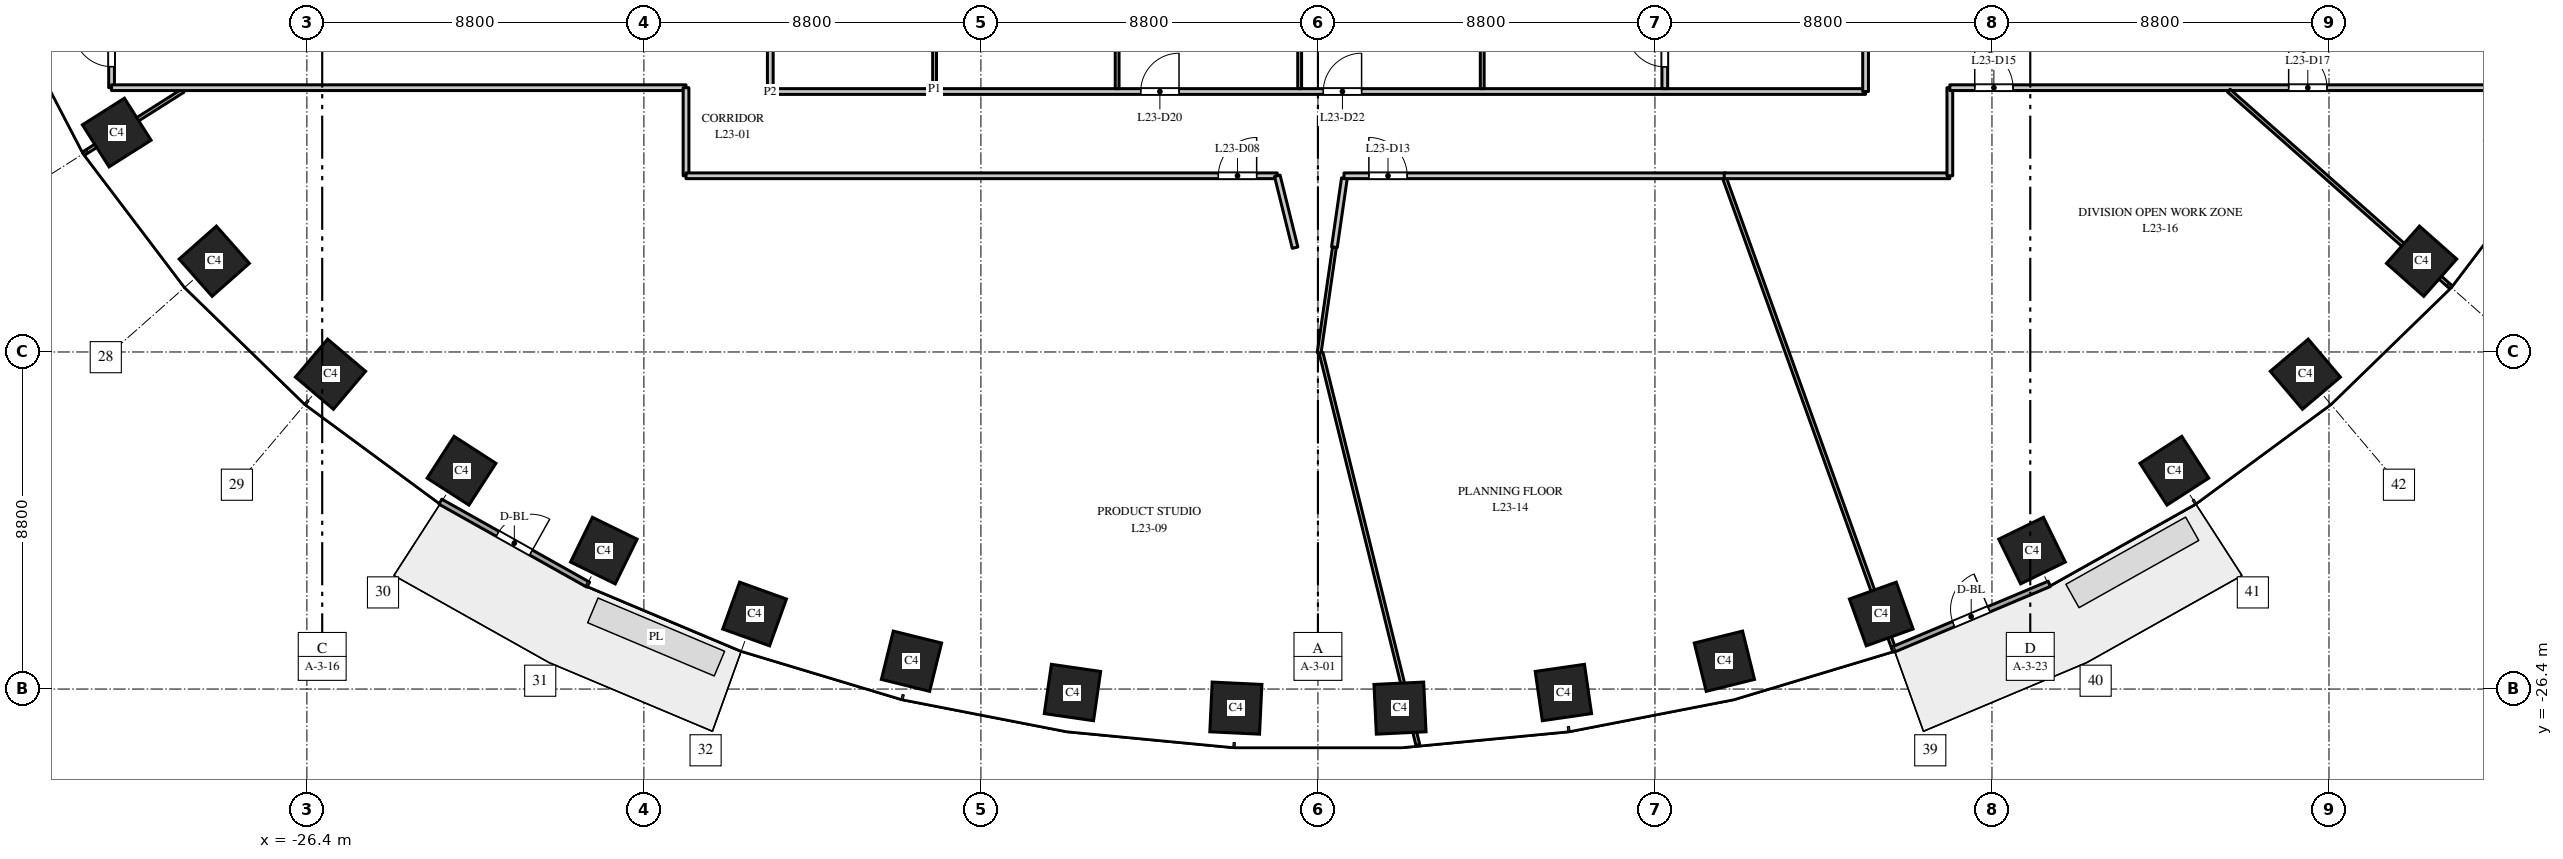
"""IFC4 building model, lengths in metres.
Left out: names, types, materials, properties, quantities, classifications, styles, units other than length and angle.
Written with IfcOpenShell. Run it as: python <this file> out.ifc"""

import sys

from ifc_helpers import new_model, si_unit, direction, frame, frame_2d, origin, origin_2d, place, context, subcontext, project, spatial, rectangle, extrude, element, fill, save


model = new_model("IFC4")
c1 = context("Model", 3, precision=1e-05, world=origin(), true_north=direction((0.0, 1.0)))
c2 = subcontext(c1, "Body", "Model", "MODEL_VIEW")
j1 = project(units=[si_unit("LENGTHUNIT", "METRE"), si_unit("PLANEANGLEUNIT", "RADIAN")], contexts=[c1])
p1 = place(None, origin())
s1 = spatial("IfcSite", under=j1, at=p1, CompositionType="ELEMENT")
p2 = place(p1, origin())
s2 = spatial("IfcBuilding", under=s1, at=p2, CompositionType="ELEMENT")
p3 = place(p2, frame((0.0, 0.0, 104.0)))
s3 = spatial("IfcBuildingStorey", under=s2, at=p3, CompositionType="ELEMENT", Elevation=104.0)
for number, where, z_axis, x_axis in (
    (1, (-31.365, -11.871, 0.0), (0.0, 0.0, 1.0), (0.535, -0.845, 0.0)),
    (2, (-28.819, -15.23, 0.0), (0.0, 0.0, 1.0), (0.663, -0.749, 0.0)),
    (3, (-25.783, -18.18, 0.0), (0.0, 0.0, 1.0), (0.763, -0.646, 0.0)),
    (4, (-22.362, -20.7, 0.0), (0.0, 0.0, 1.0), (0.84, -0.542, 0.0)),
    (5, (-18.646, -22.785, 0.0), (0.0, 0.0, 1.0), (0.898, -0.439, 0.0)),
    (6, (-14.709, -24.441, 0.0), (0.0, 0.0, 1.0), (0.941, -0.338, 0.0)),
    (7, (-10.613, -25.674, 0.0), (0.0, 0.0, 1.0), (0.971, -0.24, 0.0)),
    (8, (-6.409, -26.491, 0.0), (0.0, 0.0, 1.0), (0.99, -0.143, 0.0)),
    (9, (-2.143, -26.898, 0.0), (0.0, 0.0, 1.0), (0.999, -0.048, 0.0)),
    (10, (2.143, -26.898, 0.0), (0.0, 0.0, 1.0), (0.999, 0.048, 0.0)),
    (11, (6.409, -26.491, 0.0), (0.0, 0.0, 1.0), (0.99, 0.143, 0.0)),
    (12, (10.613, -25.674, 0.0), (0.0, 0.0, 1.0), (0.971, 0.24, 0.0)),
    (13, (14.709, -24.441, 0.0), (0.0, 0.0, 1.0), (0.941, 0.338, 0.0)),
    (14, (18.646, -22.785, 0.0), (0.0, 0.0, 1.0), (0.898, 0.439, 0.0)),
    (15, (22.362, -20.7, 0.0), (0.0, 0.0, 1.0), (0.84, 0.542, 0.0)),
    (16, (25.783, -18.18, 0.0), (0.0, 0.0, 1.0), (0.763, 0.646, 0.0)),
    (17, (28.819, -15.23, 0.0), (0.0, 0.0, 1.0), (0.663, 0.749, 0.0)),
):
    element("IfcColumn", number, at=place(p3, frame(where, z_axis=z_axis, x_axis=x_axis)), inside=s3, PredefinedType="COLUMN", context=c2, shape_type="SweptSolid", body=[
        extrude(rectangle(XDim=1.3, YDim=1.3, at=origin_2d()), origin(), (0.0, 0.0, 1.0), 4.0),
    ])
p4 = place(p3, frame((-22.913, -21.509, 0.0), z_axis=(0.0, 0.0, 1.0), x_axis=(0.872046572975, -0.489422899509, 0.0)))
e18 = element("IfcWall", 18, at=p4, inside=s3, PredefinedType="STANDARD", context=c2, shape_type="SweptSolid", body=[
    extrude(rectangle(XDim=4.426, YDim=0.15, at=frame_2d((2.213, 0.0))), origin(), (0.0, 0.0, 1.0), 3.7),
])
p5 = place(p4, frame((1.713, 0.0, 0.0)))
e19 = element("IfcOpeningElement", 19, at=p5, cuts=e18, PredefinedType="OPENING", context=c2, shape_type="SweptSolid", body=[
    extrude(rectangle(XDim=1.0, YDim=2.4, at=frame_2d((0.5, 1.2))), frame((0.0, 0.085, 0.0), z_axis=(0.0, -1.0, 0.0), x_axis=(1.0, 0.0, 0.0)), (0.0, 0.0, 1.0), 0.17),
])
p6 = place(p3, frame((15.018, -25.369, 0.0), z_axis=(0.0, 0.0, 1.0), x_axis=(0.921816985161, 0.387625393736, 0.0)))
e20 = element("IfcWall", 20, at=p6, inside=s3, PredefinedType="STANDARD", context=c2, shape_type="SweptSolid", body=[
    extrude(rectangle(XDim=4.426, YDim=0.15, at=frame_2d((2.213, 0.0))), origin(), (0.0, 0.0, 1.0), 3.7),
])
p7 = place(p6, frame((1.713, 0.0, 0.0)))
e21 = element("IfcOpeningElement", 21, at=p7, cuts=e20, PredefinedType="OPENING", context=c2, shape_type="SweptSolid", body=[
    extrude(rectangle(XDim=1.0, YDim=2.4, at=frame_2d((0.5, 1.2))), frame((0.0, 0.085, 0.0), z_axis=(0.0, -1.0, 0.0), x_axis=(1.0, 0.0, 0.0)), (0.0, 0.0, 1.0), 0.17),
])
p8 = place(p3, frame((-32.212, -12.408, 0.0), z_axis=(0.0, 0.0, 1.0), x_axis=(0.844810627195, 0.535065420467, 0.0)))
e22 = element("IfcWall", 22, at=p8, inside=s3, PredefinedType="PARTITIONING", context=c2, shape_type="SweptSolid", body=[
    extrude(rectangle(XDim=3.048, YDim=0.1, at=frame_2d((1.524, 0.0))), origin(), (0.0, 0.0, 1.0), 3.7),
])
p9 = place(p3, frame((-31.5, -10.7, 0.0), z_axis=(0.0, 0.0, 1.0), x_axis=(0.0, 1.0, 0.0)))
e23 = element("IfcWall", 23, at=p9, inside=s3, PredefinedType="PARTITIONING", context=c2, shape_type="SweptSolid", body=[
    extrude(rectangle(XDim=2.2, YDim=0.15, at=frame_2d((1.1, 0.0))), origin(), (0.0, 0.0, 1.0), 3.7),
])
p10 = place(p9, frame((0.55, 0.0, 0.0)))
e24 = element("IfcOpeningElement", 24, at=p10, cuts=e23, PredefinedType="OPENING", context=c2, shape_type="SweptSolid", body=[
    extrude(rectangle(XDim=1.0, YDim=2.1, at=frame_2d((0.5, 1.05))), frame((0.0, 0.085, 0.0), z_axis=(0.0, -1.0, 0.0), x_axis=(1.0, 0.0, 0.0)), (0.0, 0.0, 1.0), 0.17),
])
p11 = place(p3, frame((-31.5, -10.7, 0.0), z_axis=(0.0, 0.0, 1.0), x_axis=(1.0, 0.0, 0.0)))
e25 = element("IfcWall", 25, at=p11, inside=s3, PredefinedType="PARTITIONING", context=c2, shape_type="SweptSolid", body=[
    extrude(rectangle(XDim=15.0, YDim=0.15, at=frame_2d((7.5, 0.0))), origin(), (0.0, 0.0, 1.0), 3.1),
])
p12 = place(p3, frame((-16.5, -13.0, 0.0), z_axis=(0.0, 0.0, 1.0), x_axis=(0.0, 1.0, 0.0)))
e26 = element("IfcWall", 26, at=p12, inside=s3, PredefinedType="PARTITIONING", context=c2, shape_type="SweptSolid", body=[
    extrude(rectangle(XDim=2.3, YDim=0.15, at=frame_2d((1.15, 0.0))), origin(), (0.0, 0.0, 1.0), 2.75),
])
p13 = place(p3, frame((-16.5, -13.0, 0.0), z_axis=(0.0, 0.0, 1.0), x_axis=(1.0, 0.0, 0.0)))
e27 = element("IfcWall", 27, at=p13, inside=s3, PredefinedType="PARTITIONING", context=c2, shape_type="SweptSolid", body=[
    extrude(rectangle(XDim=15.439, YDim=0.15, at=frame_2d((7.719, 0.0))), origin(), (0.0, 0.0, 1.0), 2.85),
])
p14 = place(p13, frame((13.9, 0.0, 0.0)))
e28 = element("IfcOpeningElement", 28, at=p14, cuts=e27, PredefinedType="OPENING", context=c2, shape_type="SweptSolid", body=[
    extrude(rectangle(XDim=1.0, YDim=2.1, at=frame_2d((0.5, 1.05))), frame((0.0, 0.085, 0.0), z_axis=(0.0, -1.0, 0.0), x_axis=(1.0, 0.0, 0.0)), (0.0, 0.0, 1.0), 0.17),
])
p15 = place(p3, frame((-14.3, -10.8, 0.0), z_axis=(0.0, 0.0, 1.0), x_axis=(0.0, 1.0, 0.0)))
e29 = element("IfcWall", 29, at=p15, inside=s3, PredefinedType="PARTITIONING", context=c2, shape_type="SweptSolid", body=[
    extrude(rectangle(XDim=21.6, YDim=0.15, at=frame_2d((10.8, 0.0))), origin(), (0.0, 0.0, 1.0), 2.75),
])
p16 = place(p15, frame((19.9, 0.0, 0.0)))
e30 = element("IfcOpeningElement", 30, at=p16, cuts=e29, PredefinedType="OPENING", context=c2, shape_type="SweptSolid", body=[
    extrude(rectangle(XDim=1.0, YDim=2.1, at=frame_2d((0.5, 1.05))), frame((0.0, 0.085, 0.0), z_axis=(0.0, -1.0, 0.0), x_axis=(1.0, 0.0, 0.0)), (0.0, 0.0, 1.0), 0.17),
])
p17 = place(p3, frame((-14.3, -10.8, 0.0), z_axis=(0.0, 0.0, 1.0), x_axis=(1.0, 0.0, 0.0)))
e31 = element("IfcWall", 31, at=p17, inside=s3, PredefinedType="PARTITIONING", context=c2, shape_type="SweptSolid", body=[
    extrude(rectangle(XDim=28.6, YDim=0.15, at=frame_2d((14.3, 0.0))), origin(), (0.0, 0.0, 1.0), 2.85),
])
p18 = place(p17, frame((9.673, 0.0, 0.0)))
e32 = element("IfcOpeningElement", 32, at=p18, cuts=e31, PredefinedType="OPENING", context=c2, shape_type="SweptSolid", body=[
    extrude(rectangle(XDim=1.0, YDim=2.1, at=frame_2d((0.5, 1.05))), frame((0.0, 0.085, 0.0), z_axis=(0.0, -1.0, 0.0), x_axis=(1.0, 0.0, 0.0)), (0.0, 0.0, 1.0), 0.17),
])
p19 = place(p17, frame((14.44, 0.0, 0.0)))
e33 = element("IfcOpeningElement", 33, at=p19, cuts=e31, PredefinedType="OPENING", context=c2, shape_type="SweptSolid", body=[
    extrude(rectangle(XDim=1.0, YDim=2.1, at=frame_2d((0.5, 1.05))), frame((0.0, 0.085, 0.0), z_axis=(0.0, -1.0, 0.0), x_axis=(1.0, 0.0, 0.0)), (0.0, 0.0, 1.0), 0.17),
])
p20 = place(p3, frame((-10.01, -10.725, 0.0), z_axis=(0.0, 0.0, 1.0), x_axis=(0.0, 1.0, 0.0)))
e34 = element("IfcWall", 34, at=p20, inside=s3, PredefinedType="PARTITIONING", context=c2, shape_type="SweptSolid", body=[
    extrude(rectangle(XDim=21.45, YDim=0.1, at=frame_2d((10.725, 0.0))), origin(), (0.0, 0.0, 1.0), 2.75),
])
p21 = place(p3, frame((-5.243, -10.725, 0.0), z_axis=(0.0, 0.0, 1.0), x_axis=(0.0, 1.0, 0.0)))
e35 = element("IfcWall", 35, at=p21, inside=s3, PredefinedType="PARTITIONING", context=c2, shape_type="SweptSolid", body=[
    extrude(rectangle(XDim=4.666, YDim=0.1, at=frame_2d((2.333, 0.0))), origin(), (0.0, 0.0, 1.0), 2.9),
])
p22 = place(p3, frame((-1.061, -13.0, 0.0), z_axis=(0.0, 0.0, 1.0), x_axis=(0.240039134513, -0.970763212067, 0.0)))
e36 = element("IfcWall", 36, at=p22, inside=s3, PredefinedType="PARTITIONING", context=c2, shape_type="SweptSolid", body=[
    extrude(rectangle(XDim=1.934, YDim=0.15, at=frame_2d((0.967, 0.0))), origin(), (0.0, 0.0, 1.0), 2.85),
])
p23 = place(p3, frame((-0.477, -10.725, 0.0), z_axis=(0.0, 0.0, 1.0), x_axis=(0.0, 1.0, 0.0)))
e37 = element("IfcWall", 37, at=p23, inside=s3, PredefinedType="PARTITIONING", context=c2, shape_type="SweptSolid", body=[
    extrude(rectangle(XDim=3.257, YDim=0.1, at=frame_2d((1.628, 0.0))), origin(), (0.0, 0.0, 1.0), 2.9),
])
p24 = place(p3, frame((0.031, -17.627, 0.0), z_axis=(0.0, 0.0, 1.0), x_axis=(0.143195777523, 0.989694381766, 0.0)))
e38 = element("IfcWall", 38, at=p24, inside=s3, PredefinedType="PARTITIONING", context=c2, shape_type="SweptSolid", body=[
    extrude(rectangle(XDim=2.793, YDim=0.1, at=frame_2d((1.396, 0.0))), origin(), (0.0, 0.0, 1.0), 3.7),
])
p25 = place(p3, frame((0.082, -17.625, 0.0), z_axis=(0.0, 0.0, 1.0), x_axis=(0.239733297303, -0.970838784847, 0.0)))
e39 = element("IfcWall", 39, at=p25, inside=s3, PredefinedType="PARTITIONING", context=c2, shape_type="SweptSolid", body=[
    extrude(rectangle(XDim=10.54, YDim=0.1, at=frame_2d((5.27, 0.0))), origin(), (0.0, 0.0, 1.0), 2.9),
])
p26 = place(p3, frame((0.43, -14.864, 0.0), z_axis=(0.0, 0.0, 1.0), x_axis=(0.143488136145, 0.989652037226, 0.0)))
e40 = element("IfcWall", 40, at=p26, inside=s3, PredefinedType="PARTITIONING", context=c2, shape_type="SweptSolid", body=[
    extrude(rectangle(XDim=1.819, YDim=0.15, at=frame_2d((0.909, 0.0))), origin(), (0.0, 0.0, 1.0), 3.7),
])
p27 = place(p3, frame((0.68, -13.0, 0.0), z_axis=(0.0, 0.0, 1.0), x_axis=(1.0, 0.0, 0.0)))
e41 = element("IfcWall", 41, at=p27, inside=s3, PredefinedType="PARTITIONING", context=c2, shape_type="SweptSolid", body=[
    extrude(rectangle(XDim=9.968, YDim=0.15, at=frame_2d((4.984, 0.0))), origin(), (0.0, 0.0, 1.0), 2.85),
])
p28 = place(p27, frame((0.65, 0.0, 0.0)))
e42 = element("IfcOpeningElement", 42, at=p28, cuts=e41, PredefinedType="OPENING", context=c2, shape_type="SweptSolid", body=[
    extrude(rectangle(XDim=1.0, YDim=2.1, at=frame_2d((0.5, 1.05))), frame((0.0, 0.085, 0.0), z_axis=(0.0, -1.0, 0.0), x_axis=(1.0, 0.0, 0.0)), (0.0, 0.0, 1.0), 0.17),
])
p29 = place(p3, frame((4.29, -10.725, 0.0), z_axis=(0.0, 0.0, 1.0), x_axis=(0.0, 1.0, 0.0)))
e43 = element("IfcWall", 43, at=p29, inside=s3, PredefinedType="PARTITIONING", context=c2, shape_type="SweptSolid", body=[
    extrude(rectangle(XDim=4.157, YDim=0.1, at=frame_2d((2.079, 0.0))), origin(), (0.0, 0.0, 1.0), 2.9),
])
p30 = place(p3, frame((9.057, -10.725, 0.0), z_axis=(0.0, 0.0, 1.0), x_axis=(0.0, 1.0, 0.0)))
e44 = element("IfcWall", 44, at=p30, inside=s3, PredefinedType="PARTITIONING", context=c2, shape_type="SweptSolid", body=[
    extrude(rectangle(XDim=10.68, YDim=0.15, at=frame_2d((5.34, 0.0))), origin(), (0.0, 0.0, 1.0), 2.75),
])
p31 = place(p30, frame((0.57, 0.0, 0.0)))
e45 = element("IfcOpeningElement", 45, at=p31, cuts=e44, PredefinedType="OPENING", context=c2, shape_type="SweptSolid", body=[
    extrude(rectangle(XDim=1.0, YDim=2.1, at=frame_2d((0.5, 1.05))), frame((0.0, 0.085, 0.0), z_axis=(0.0, -1.0, 0.0), x_axis=(1.0, 0.0, 0.0)), (0.0, 0.0, 1.0), 0.17),
])
p32 = place(p3, frame((10.622, -13.075, 0.0), z_axis=(0.0, 0.0, 1.0), x_axis=(0.338388305095, -0.941006564788, 0.0)))
e46 = element("IfcWall", 46, at=p32, inside=s3, PredefinedType="PARTITIONING", context=c2, shape_type="SweptSolid", body=[
    extrude(rectangle(XDim=13.08, YDim=0.1, at=frame_2d((6.54, 0.0))), origin(), (0.0, 0.0, 1.0), 2.85),
])
p33 = place(p3, frame((10.607, -13.0, 0.0), z_axis=(0.0, 0.0, 1.0), x_axis=(1.0, 0.0, 0.0)))
e47 = element("IfcWall", 47, at=p33, inside=s3, PredefinedType="PARTITIONING", context=c2, shape_type="SweptSolid", body=[
    extrude(rectangle(XDim=5.893, YDim=0.15, at=frame_2d((2.947, 0.0))), origin(), (0.0, 0.0, 1.0), 3.7),
])
p34 = place(p3, frame((14.3, -10.8, 0.0), z_axis=(0.0, 0.0, 1.0), x_axis=(0.0, 1.0, 0.0)))
e48 = element("IfcWall", 48, at=p34, inside=s3, PredefinedType="PARTITIONING", context=c2, shape_type="SweptSolid", body=[
    extrude(rectangle(XDim=21.6, YDim=0.15, at=frame_2d((10.8, 0.0))), origin(), (0.0, 0.0, 1.0), 2.75),
])
p35 = place(p34, frame((19.95, 0.0, 0.0)))
e49 = element("IfcOpeningElement", 49, at=p35, cuts=e48, PredefinedType="OPENING", context=c2, shape_type="SweptSolid", body=[
    extrude(rectangle(XDim=1.0, YDim=2.1, at=frame_2d((0.5, 1.05))), frame((0.0, 0.085, 0.0), z_axis=(0.0, -1.0, 0.0), x_axis=(1.0, 0.0, 0.0)), (0.0, 0.0, 1.0), 0.17),
])
p36 = place(p3, frame((16.5, -13.0, 0.0), z_axis=(0.0, 0.0, 1.0), x_axis=(0.0, 1.0, 0.0)))
e50 = element("IfcWall", 50, at=p36, inside=s3, PredefinedType="PARTITIONING", context=c2, shape_type="SweptSolid", body=[
    extrude(rectangle(XDim=2.3, YDim=0.15, at=frame_2d((1.15, 0.0))), origin(), (0.0, 0.0, 1.0), 3.7),
])
p37 = place(p3, frame((16.5, -10.7, 0.0), z_axis=(0.0, 0.0, 1.0), x_axis=(1.0, 0.0, 0.0)))
e51 = element("IfcWall", 51, at=p37, inside=s3, PredefinedType="PARTITIONING", context=c2, shape_type="SweptSolid", body=[
    extrude(rectangle(XDim=15.0, YDim=0.15, at=frame_2d((7.5, 0.0))), origin(), (0.0, 0.0, 1.0), 2.75),
])
p38 = place(p37, frame((0.65, 0.0, 0.0)))
e52 = element("IfcOpeningElement", 52, at=p38, cuts=e51, PredefinedType="OPENING", context=c2, shape_type="SweptSolid", body=[
    extrude(rectangle(XDim=1.0, YDim=2.1, at=frame_2d((0.5, 1.05))), frame((0.0, 0.085, 0.0), z_axis=(0.0, -1.0, 0.0), x_axis=(1.0, 0.0, 0.0)), (0.0, 0.0, 1.0), 0.17),
])
p39 = place(p37, frame((8.847, 0.0, 0.0)))
e53 = element("IfcOpeningElement", 53, at=p39, cuts=e51, PredefinedType="OPENING", context=c2, shape_type="SweptSolid", body=[
    extrude(rectangle(XDim=1.0, YDim=2.1, at=frame_2d((0.5, 1.05))), frame((0.0, 0.085, 0.0), z_axis=(0.0, -1.0, 0.0), x_axis=(1.0, 0.0, 0.0)), (0.0, 0.0, 1.0), 0.17),
])
p40 = place(p3, frame((23.785, -10.778, 0.0), z_axis=(0.0, 0.0, 1.0), x_axis=(0.748985701008, -0.662586160198, 0.0)))
e54 = element("IfcWall", 54, at=p40, inside=s3, PredefinedType="PARTITIONING", context=c2, shape_type="SweptSolid", body=[
    extrude(rectangle(XDim=7.723, YDim=0.1, at=frame_2d((3.861, 0.0))), origin(), (0.0, 0.0, 1.0), 3.7),
])
p41 = place(p5, origin())
e55 = element("IfcDoor", 55, at=p41, inside=s3, OperationType="SINGLE_SWING_RIGHT", PredefinedType="DOOR", context=c2, shape_type="SweptSolid", body=[
    extrude(rectangle(XDim=1.0, YDim=2.4, at=frame_2d((0.5, 1.2))), frame((0.0, 0.025, 0.0), z_axis=(0.0, -1.0, 0.0), x_axis=(1.0, 0.0, 0.0)), (0.0, 0.0, 1.0), 0.05),
])
fill(e19, e55)
p42 = place(p7, origin())
e56 = element("IfcDoor", 56, at=p42, inside=s3, OperationType="SINGLE_SWING_RIGHT", PredefinedType="DOOR", context=c2, shape_type="SweptSolid", body=[
    extrude(rectangle(XDim=1.0, YDim=2.4, at=frame_2d((0.5, 1.2))), frame((0.0, 0.025, 0.0), z_axis=(0.0, -1.0, 0.0), x_axis=(1.0, 0.0, 0.0)), (0.0, 0.0, 1.0), 0.05),
])
fill(e21, e56)
p43 = place(p10, origin())
e57 = element("IfcDoor", 57, at=p43, inside=s3, OperationType="SINGLE_SWING_RIGHT", PredefinedType="DOOR", context=c2, shape_type="SweptSolid", body=[
    extrude(rectangle(XDim=1.0, YDim=2.1, at=frame_2d((0.5, 1.05))), frame((0.0, 0.025, 0.0), z_axis=(0.0, -1.0, 0.0), x_axis=(1.0, 0.0, 0.0)), (0.0, 0.0, 1.0), 0.05),
])
fill(e24, e57)
p44 = place(p14, origin())
e58 = element("IfcDoor", 58, at=p44, inside=s3, OperationType="SINGLE_SWING_RIGHT", PredefinedType="DOOR", context=c2, shape_type="SweptSolid", body=[
    extrude(rectangle(XDim=1.0, YDim=2.1, at=frame_2d((0.5, 1.05))), frame((0.0, 0.025, 0.0), z_axis=(0.0, -1.0, 0.0), x_axis=(1.0, 0.0, 0.0)), (0.0, 0.0, 1.0), 0.05),
])
fill(e28, e58)
p45 = place(p28, origin())
e59 = element("IfcDoor", 59, at=p45, inside=s3, OperationType="SINGLE_SWING_LEFT", PredefinedType="DOOR", context=c2, shape_type="SweptSolid", body=[
    extrude(rectangle(XDim=1.0, YDim=2.1, at=frame_2d((0.5, 1.05))), frame((0.0, 0.025, 0.0), z_axis=(0.0, -1.0, 0.0), x_axis=(1.0, 0.0, 0.0)), (0.0, 0.0, 1.0), 0.05),
])
fill(e42, e59)
p46 = place(p38, origin())
e60 = element("IfcDoor", 60, at=p46, inside=s3, OperationType="SINGLE_SWING_LEFT", PredefinedType="DOOR", context=c2, shape_type="SweptSolid", body=[
    extrude(rectangle(XDim=1.0, YDim=2.1, at=frame_2d((0.5, 1.05))), frame((0.0, 0.025, 0.0), z_axis=(0.0, -1.0, 0.0), x_axis=(1.0, 0.0, 0.0)), (0.0, 0.0, 1.0), 0.05),
])
fill(e52, e60)
p47 = place(p39, origin())
e61 = element("IfcDoor", 61, at=p47, inside=s3, OperationType="SINGLE_SWING_LEFT", PredefinedType="DOOR", context=c2, shape_type="SweptSolid", body=[
    extrude(rectangle(XDim=1.0, YDim=2.1, at=frame_2d((0.5, 1.05))), frame((0.0, 0.025, 0.0), z_axis=(0.0, -1.0, 0.0), x_axis=(1.0, 0.0, 0.0)), (0.0, 0.0, 1.0), 0.05),
])
fill(e53, e61)
p48 = place(p18, origin())
e62 = element("IfcDoor", 62, at=p48, inside=s3, OperationType="SINGLE_SWING_RIGHT", PredefinedType="DOOR", context=c2, shape_type="SweptSolid", body=[
    extrude(rectangle(XDim=1.0, YDim=2.1, at=frame_2d((0.5, 1.05))), frame((0.0, 0.025, 0.0), z_axis=(0.0, -1.0, 0.0), x_axis=(1.0, 0.0, 0.0)), (0.0, 0.0, 1.0), 0.05),
])
fill(e32, e62)
p49 = place(p19, origin())
e63 = element("IfcDoor", 63, at=p49, inside=s3, OperationType="SINGLE_SWING_RIGHT", PredefinedType="DOOR", context=c2, shape_type="SweptSolid", body=[
    extrude(rectangle(XDim=1.0, YDim=2.1, at=frame_2d((0.5, 1.05))), frame((0.0, 0.025, 0.0), z_axis=(0.0, -1.0, 0.0), x_axis=(1.0, 0.0, 0.0)), (0.0, 0.0, 1.0), 0.05),
])
fill(e33, e63)
p50 = place(p31, origin())
e64 = element("IfcDoor", 64, at=p50, inside=s3, OperationType="SINGLE_SWING_RIGHT", PredefinedType="DOOR", context=c2, shape_type="SweptSolid", body=[
    extrude(rectangle(XDim=1.0, YDim=2.1, at=frame_2d((0.5, 1.05))), frame((0.0, 0.025, 0.0), z_axis=(0.0, -1.0, 0.0), x_axis=(1.0, 0.0, 0.0)), (0.0, 0.0, 1.0), 0.05),
])
fill(e45, e64)
save(model, sys.argv[1])
